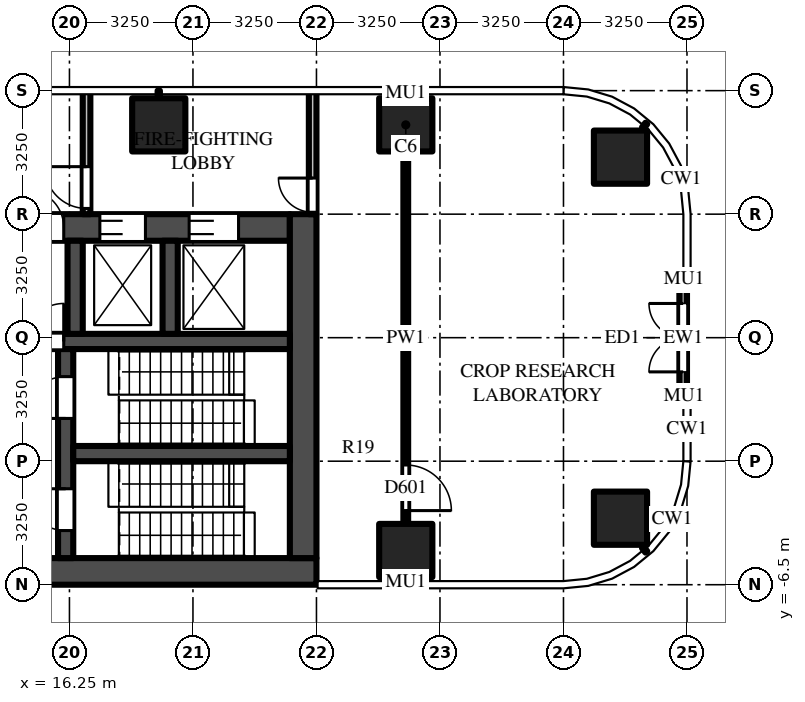
"""IFC4 building model, lengths in metres.
Left out: names, types, materials, properties, quantities, classifications, styles, units other than length and angle.
Written with IfcOpenShell. Run it as: python <this file> out.ifc"""

import sys

from ifc_helpers import new_model, si_unit, direction, frame, frame_2d, origin, origin_2d, place, context, subcontext, project, spatial, rectangle, extrude, source, transform, mapped, element, fill, save


model = new_model("IFC4")
c1 = context("Model", 3, precision=1e-05, world=origin(), true_north=direction((0.0, 1.0)))
c2 = subcontext(c1, "Body", "Model", "MODEL_VIEW")
j1 = project(units=[si_unit("LENGTHUNIT", "METRE"), si_unit("PLANEANGLEUNIT", "RADIAN")], contexts=[c1])
p1 = place(None, origin())
s1 = spatial("IfcSite", under=j1, at=p1, CompositionType="ELEMENT")
p2 = place(p1, origin())
s2 = spatial("IfcBuilding", under=s1, at=p2, CompositionType="ELEMENT")
p3 = place(p2, frame((0.0, 0.0, 38.5)))
s3 = spatial("IfcBuildingStorey", under=s2, at=p3, CompositionType="ELEMENT", Elevation=38.5)
m1 = source(origin(), c2, "Body", "SweptSolid", [
    extrude(rectangle(XDim=1.4, YDim=1.4, at=origin_2d()), origin(), (0.0, 0.0, 1.0), 4.5),
])
for number, where, z_axis, x_axis in (
    (1, (18.6, 5.6, 0.0), (0.0, 0.0, 1.0), (1.0, 0.0, 0.0)),
    (2, (25.1, 5.6, 0.0), (0.0, 0.0, 1.0), (1.0, 0.0, 0.0)),
    (3, (30.75, 4.75, 0.0), (0.0, 0.0, 1.0), (1.0, 0.0, 0.0)),
    (4, (25.1, -5.6, 0.0), (0.0, 0.0, 1.0), (1.0, 0.0, 0.0)),
    (5, (30.75, -4.75, 0.0), (0.0, 0.0, 1.0), (1.0, 0.0, 0.0)),
):
    element("IfcColumn", number, at=place(p3, frame(where, z_axis=z_axis, x_axis=x_axis)), inside=s3, PredefinedType="COLUMN", context=c2, shape_type="MappedRepresentation", body=[
        mapped(m1, transform((0.0, 0.0, 0.0))),
    ])
m2 = source(origin(), c2, "Body", "SweptSolid", [
    extrude(rectangle(XDim=16.45, YDim=0.7, at=frame_2d((8.225, 0.0))), origin(), (0.0, 0.0, 1.0), 4.25),
])
p4 = place(p3, frame((6.3, -6.15, 0.0), z_axis=(0.0, 0.0, 1.0), x_axis=(1.0, 0.0, 0.0)))
e6 = element("IfcWall", 6, at=p4, inside=s3, PredefinedType="SHEAR", context=c2, shape_type="MappedRepresentation", body=[
    mapped(m2, transform((0.0, 0.0, 0.0))),
])
m3 = source(origin(), c2, "Body", "SweptSolid", [
    extrude(rectangle(XDim=14.85, YDim=0.7, at=frame_2d((7.425, 0.0))), origin(), (0.0, 0.0, 1.0), 4.25),
])
p5 = place(p3, frame((7.2, 2.9, 0.0), z_axis=(0.0, 0.0, 1.0), x_axis=(1.0, 0.0, 0.0)))
e7 = element("IfcWall", 7, at=p5, inside=s3, PredefinedType="SHEAR", context=c2, shape_type="MappedRepresentation", body=[
    mapped(m3, transform((0.0, 0.0, 0.0))),
])
m4 = source(origin(), c2, "Body", "SweptSolid", [
    extrude(rectangle(XDim=1.3, YDim=2.1, at=frame_2d((0.65, 1.05))), frame((0.0, 0.36, 0.0), z_axis=(0.0, -1.0, 0.0), x_axis=(1.0, 0.0, 0.0)), (0.0, 0.0, 1.0), 0.72),
])
p6 = place(p5, frame((12.2, 0.0, 0.0)))
e8 = element("IfcOpeningElement", 8, at=p6, cuts=e7, PredefinedType="OPENING", context=c2, shape_type="MappedRepresentation", body=[
    mapped(m4, transform((0.0, 0.0, 0.0))),
])
m5 = source(origin(), c2, "Body", "SweptSolid", [
    extrude(rectangle(XDim=1.2, YDim=2.1, at=frame_2d((0.6, 1.05))), frame((0.0, 0.36, 0.0), z_axis=(0.0, -1.0, 0.0), x_axis=(1.0, 0.0, 0.0)), (0.0, 0.0, 1.0), 0.72),
])
p7 = place(p5, frame((9.85, 0.0, 0.0)))
e9 = element("IfcOpeningElement", 9, at=p7, cuts=e7, PredefinedType="OPENING", context=c2, shape_type="MappedRepresentation", body=[
    mapped(m5, transform((0.0, 0.0, 0.0))),
])
m6 = source(origin(), c2, "Body", "SweptSolid", [
    extrude(rectangle(XDim=1.0, YDim=2.1, at=frame_2d((0.5, 1.05))), frame((0.0, 0.36, 0.0), z_axis=(0.0, -1.0, 0.0), x_axis=(1.0, 0.0, 0.0)), (0.0, 0.0, 1.0), 0.72),
])
p8 = place(p5, frame((7.9, 0.0, 0.0)))
e10 = element("IfcOpeningElement", 10, at=p8, cuts=e7, PredefinedType="OPENING", context=c2, shape_type="MappedRepresentation", body=[
    mapped(m6, transform((0.0, 0.0, 0.0))),
])
m7 = source(origin(), c2, "Body", "SweptSolid", [
    extrude(rectangle(XDim=0.9, YDim=2.1, at=frame_2d((0.45, 1.05))), frame((0.0, 0.36, 0.0), z_axis=(0.0, -1.0, 0.0), x_axis=(1.0, 0.0, 0.0)), (0.0, 0.0, 1.0), 0.72),
])
p9 = place(p5, frame((0.65, 0.0, 0.0)))
e11 = element("IfcOpeningElement", 11, at=p9, cuts=e7, PredefinedType="OPENING", context=c2, shape_type="MappedRepresentation", body=[
    mapped(m7, transform((0.0, 0.0, 0.0))),
])
p10 = place(p5, frame((3.25, 0.0, 0.0)))
e12 = element("IfcOpeningElement", 12, at=p10, cuts=e7, PredefinedType="OPENING", context=c2, shape_type="MappedRepresentation", body=[
    mapped(m7, transform((0.0, 0.0, 0.0))),
])
p11 = place(p5, frame((5.8, 0.0, 0.0)))
e13 = element("IfcOpeningElement", 13, at=p11, cuts=e7, PredefinedType="OPENING", context=c2, shape_type="MappedRepresentation", body=[
    mapped(m6, transform((0.0, 0.0, 0.0))),
])
m8 = source(origin(), c2, "Body", "SweptSolid", [
    extrude(rectangle(XDim=9.05, YDim=0.7, at=frame_2d((4.525, 0.0))), origin(), (0.0, 0.0, 1.0), 4.25),
])
p12 = place(p3, frame((22.4, -5.8, 0.0), z_axis=(0.0, 0.0, 1.0), x_axis=(0.0, 1.0, 0.0)))
e14 = element("IfcWall", 14, at=p12, inside=s3, PredefinedType="SHEAR", context=c2, shape_type="MappedRepresentation", body=[
    mapped(m8, transform((0.0, 0.0, 0.0))),
])
m9 = source(origin(), c2, "Body", "SweptSolid", [
    extrude(rectangle(XDim=14.85, YDim=0.4, at=frame_2d((7.425, 0.0))), origin(), (0.0, 0.0, 1.0), 4.25),
])
p13 = place(p3, frame((7.2, -0.1, 0.0), z_axis=(0.0, 0.0, 1.0), x_axis=(1.0, 0.0, 0.0)))
e15 = element("IfcWall", 15, at=p13, inside=s3, PredefinedType="SHEAR", context=c2, shape_type="MappedRepresentation", body=[
    mapped(m9, transform((0.0, 0.0, 0.0))),
])
m10 = source(origin(), c2, "Body", "SweptSolid", [
    extrude(rectangle(XDim=1.0, YDim=2.1, at=frame_2d((0.5, 1.05))), frame((0.0, 0.21, 0.0), z_axis=(0.0, -1.0, 0.0), x_axis=(1.0, 0.0, 0.0)), (0.0, 0.0, 1.0), 0.42),
])
p14 = place(p13, frame((7.9, 0.0, 0.0)))
e16 = element("IfcOpeningElement", 16, at=p14, cuts=e15, PredefinedType="OPENING", context=c2, shape_type="MappedRepresentation", body=[
    mapped(m10, transform((0.0, 0.0, 0.0))),
])
m11 = source(origin(), c2, "Body", "SweptSolid", [
    extrude(rectangle(XDim=5.5, YDim=0.4, at=frame_2d((2.75, 0.0))), origin(), (0.0, 0.0, 1.0), 4.25),
])
p15 = place(p3, frame((16.15, -5.8, 0.0), z_axis=(0.0, 0.0, 1.0), x_axis=(0.0, 1.0, 0.0)))
e17 = element("IfcWall", 17, at=p15, inside=s3, PredefinedType="SHEAR", context=c2, shape_type="MappedRepresentation", body=[
    mapped(m11, transform((0.0, 0.0, 0.0))),
])
m12 = source(origin(), c2, "Body", "SweptSolid", [
    extrude(rectangle(XDim=1.1, YDim=2.1, at=frame_2d((0.55, 1.05))), frame((0.0, 0.21, 0.0), z_axis=(0.0, -1.0, 0.0), x_axis=(1.0, 0.0, 0.0)), (0.0, 0.0, 1.0), 0.42),
])
p16 = place(p15, frame((0.725, 0.0, 0.0)))
e18 = element("IfcOpeningElement", 18, at=p16, cuts=e17, PredefinedType="OPENING", context=c2, shape_type="MappedRepresentation", body=[
    mapped(m12, transform((0.0, 0.0, 0.0))),
])
p17 = place(p15, frame((3.675, 0.0, 0.0)))
e19 = element("IfcOpeningElement", 19, at=p17, cuts=e17, PredefinedType="OPENING", context=c2, shape_type="MappedRepresentation", body=[
    mapped(m12, transform((0.0, 0.0, 0.0))),
])
m13 = source(origin(), c2, "Body", "SweptSolid", [
    extrude(rectangle(XDim=5.7, YDim=0.4, at=frame_2d((2.85, 0.0))), origin(), (0.0, 0.0, 1.0), 4.25),
])
p18 = place(p3, frame((16.35, -3.05, 0.0), z_axis=(0.0, 0.0, 1.0), x_axis=(1.0, 0.0, 0.0)))
e20 = element("IfcWall", 20, at=p18, inside=s3, PredefinedType="SHEAR", context=c2, shape_type="MappedRepresentation", body=[
    mapped(m13, transform((0.0, 0.0, 0.0))),
])
m14 = source(origin(), c2, "Body", "SweptSolid", [
    extrude(rectangle(XDim=2.45, YDim=0.4, at=frame_2d((1.225, 0.0))), origin(), (0.0, 0.0, 1.0), 4.25),
])
for number, where, z_axis, x_axis in (
    (21, (16.4, 0.1, 0.0), (0.0, 0.0, 1.0), (0.0, 1.0, 0.0)),
    (22, (18.9, 0.1, 0.0), (0.0, 0.0, 1.0), (0.0, 1.0, 0.0)),
):
    element("IfcWall", number, at=place(p3, frame(where, z_axis=z_axis, x_axis=x_axis)), inside=s3, PredefinedType="SHEAR", context=c2, shape_type="MappedRepresentation", body=[
        mapped(m14, transform((0.0, 0.0, 0.0))),
    ])
m15 = source(origin(), c2, "Body", "SweptSolid", [
    extrude(rectangle(XDim=3.25, YDim=0.2, at=frame_2d((1.625, 0.0))), origin(), (0.0, 0.0, 1.0), 4.25),
])
p19 = place(p3, frame((16.7, 3.25, 0.0), z_axis=(0.0, 0.0, 1.0), x_axis=(0.0, 1.0, 0.0)))
e23 = element("IfcWall", 23, at=p19, inside=s3, PredefinedType="PARTITIONING", context=c2, shape_type="MappedRepresentation", body=[
    mapped(m15, transform((0.0, 0.0, 0.0))),
])
m16 = source(origin(), c2, "Body", "SweptSolid", [
    extrude(rectangle(XDim=1.1, YDim=2.1, at=frame_2d((0.55, 1.05))), frame((0.0, 0.11, 0.0), z_axis=(0.0, -1.0, 0.0), x_axis=(1.0, 0.0, 0.0)), (0.0, 0.0, 1.0), 0.22),
])
p20 = place(p19, frame((0.15, 0.0, 0.0)))
e24 = element("IfcOpeningElement", 24, at=p20, cuts=e23, PredefinedType="OPENING", context=c2, shape_type="MappedRepresentation", body=[
    mapped(m16, transform((0.0, 0.0, 0.0))),
])
p21 = place(p3, frame((22.65, 3.25, 0.0), z_axis=(0.0, 0.0, 1.0), x_axis=(0.0, 1.0, 0.0)))
e25 = element("IfcWall", 25, at=p21, inside=s3, PredefinedType="PARTITIONING", context=c2, shape_type="MappedRepresentation", body=[
    mapped(m15, transform((0.0, 0.0, 0.0))),
])
m17 = source(origin(), c2, "Body", "SweptSolid", [
    extrude(rectangle(XDim=0.9, YDim=2.1, at=frame_2d((0.45, 1.05))), frame((0.0, 0.11, 0.0), z_axis=(0.0, -1.0, 0.0), x_axis=(1.0, 0.0, 0.0)), (0.0, 0.0, 1.0), 0.22),
])
p22 = place(p21, frame((0.05, 0.0, 0.0)))
e26 = element("IfcOpeningElement", 26, at=p22, cuts=e25, PredefinedType="OPENING", context=c2, shape_type="MappedRepresentation", body=[
    mapped(m17, transform((0.0, 0.0, 0.0))),
])
m18 = source(origin(), c2, "Body", "SweptSolid", [
    extrude(rectangle(XDim=3.0, YDim=0.2, at=frame_2d((1.5, 0.0))), origin(), (0.0, 0.0, 1.0), 4.25),
])
p23 = place(p3, frame((32.4, -1.5, 0.0), z_axis=(0.0, 0.0, 1.0), x_axis=(0.0, 1.0, 0.0)))
e27 = element("IfcWall", 27, at=p23, inside=s3, PredefinedType="SOLIDWALL", context=c2, shape_type="MappedRepresentation", body=[
    mapped(m18, transform((0.0, 0.0, 0.0))),
])
m19 = source(origin(), c2, "Body", "SweptSolid", [
    extrude(rectangle(XDim=1.8, YDim=2.4, at=frame_2d((0.9, 1.2))), frame((0.0, 0.11, 0.0), z_axis=(0.0, -1.0, 0.0), x_axis=(1.0, 0.0, 0.0)), (0.0, 0.0, 1.0), 0.22),
])
p24 = place(p23, frame((0.6, 0.0, 0.0)))
e28 = element("IfcOpeningElement", 28, at=p24, cuts=e27, PredefinedType="OPENING", context=c2, shape_type="MappedRepresentation", body=[
    mapped(m19, transform((0.0, 0.0, 0.0))),
])
m20 = source(origin(), c2, "Body", "SweptSolid", [
    extrude(rectangle(XDim=9.8, YDim=0.125, at=frame_2d((4.9, 0.0))), origin(), (0.0, 0.0, 1.0), 3.468),
])
p25 = place(p3, frame((25.1, 4.9, 0.0), z_axis=(0.0, 0.0, 1.0), x_axis=(0.0, -1.0, 0.0)))
e29 = element("IfcWall", 29, at=p25, inside=s3, PredefinedType="PARTITIONING", context=c2, shape_type="MappedRepresentation", body=[
    mapped(m20, transform((0.0, 0.0, 0.0))),
])
m21 = source(origin(), c2, "Body", "SweptSolid", [
    extrude(rectangle(XDim=1.2, YDim=2.1, at=frame_2d((0.6, 1.05))), frame((0.0, 0.073, 0.0), z_axis=(0.0, -1.0, 0.0), x_axis=(1.0, 0.0, 0.0)), (0.0, 0.0, 1.0), 0.145),
])
p26 = place(p25, frame((8.25, 0.0, 0.0)))
e30 = element("IfcOpeningElement", 30, at=p26, cuts=e29, PredefinedType="OPENING", context=c2, shape_type="MappedRepresentation", body=[
    mapped(m21, transform((0.0, 0.0, 0.0))),
])
m22 = source(origin(), c2, "Body", "SweptSolid", [
    extrude(rectangle(XDim=1.3, YDim=2.1, at=frame_2d((0.65, 1.05))), frame((0.0, -0.275, 0.0), z_axis=(0.0, -1.0, 0.0), x_axis=(1.0, 0.0, 0.0)), (0.0, 0.0, 1.0), 0.05),
])
p27 = place(p6, origin())
e31 = element("IfcDoor", 31, at=p27, inside=s3, OperationType="DOUBLE_DOOR_SLIDING", PredefinedType="DOOR", context=c2, shape_type="MappedRepresentation", body=[
    mapped(m22, transform((0.0, 0.0, 0.0))),
])
fill(e8, e31)
m23 = source(origin(), c2, "Body", "SweptSolid", [
    extrude(rectangle(XDim=1.2, YDim=2.1, at=frame_2d((0.6, 1.05))), frame((0.0, -0.275, 0.0), z_axis=(0.0, -1.0, 0.0), x_axis=(1.0, 0.0, 0.0)), (0.0, 0.0, 1.0), 0.05),
])
p28 = place(p7, origin())
e32 = element("IfcDoor", 32, at=p28, inside=s3, OperationType="DOUBLE_DOOR_SLIDING", PredefinedType="DOOR", context=c2, shape_type="MappedRepresentation", body=[
    mapped(m23, transform((0.0, 0.0, 0.0))),
])
fill(e9, e32)
m24 = source(origin(), c2, "Body", "SweptSolid", [
    extrude(rectangle(XDim=1.1, YDim=2.1, at=frame_2d((0.55, 1.05))), frame((0.0, 0.025, 0.0), z_axis=(0.0, -1.0, 0.0), x_axis=(1.0, 0.0, 0.0)), (0.0, 0.0, 1.0), 0.05),
])
p29 = place(p16, origin())
e33 = element("IfcDoor", 33, at=p29, inside=s3, OperationType="SINGLE_SWING_RIGHT", PredefinedType="DOOR", context=c2, shape_type="MappedRepresentation", body=[
    mapped(m24, transform((0.0, 0.0, 0.0))),
])
fill(e18, e33)
p30 = place(p17, origin())
e34 = element("IfcDoor", 34, at=p30, inside=s3, OperationType="SINGLE_SWING_LEFT", PredefinedType="DOOR", context=c2, shape_type="MappedRepresentation", body=[
    mapped(m24, transform((0.0, 0.0, 0.0))),
])
fill(e19, e34)
m25 = source(origin(), c2, "Body", "SweptSolid", [
    extrude(rectangle(XDim=1.0, YDim=2.1, at=frame_2d((0.5, 1.05))), frame((0.0, 0.025, 0.0), z_axis=(0.0, -1.0, 0.0), x_axis=(1.0, 0.0, 0.0)), (0.0, 0.0, 1.0), 0.05),
])
p31 = place(p14, origin())
e35 = element("IfcDoor", 35, at=p31, inside=s3, OperationType="SINGLE_SWING_RIGHT", PredefinedType="DOOR", context=c2, shape_type="MappedRepresentation", body=[
    mapped(m25, transform((0.0, 0.0, 0.0))),
])
fill(e16, e35)
m26 = source(origin(), c2, "Body", "SweptSolid", [
    extrude(rectangle(XDim=1.0, YDim=2.1, at=frame_2d((0.5, 1.05))), frame((0.0, -0.275, 0.0), z_axis=(0.0, -1.0, 0.0), x_axis=(1.0, 0.0, 0.0)), (0.0, 0.0, 1.0), 0.05),
])
p32 = place(p8, origin())
e36 = element("IfcDoor", 36, at=p32, inside=s3, OperationType="SINGLE_SWING_LEFT", PredefinedType="DOOR", context=c2, shape_type="MappedRepresentation", body=[
    mapped(m26, transform((0.0, 0.0, 0.0))),
])
fill(e10, e36)
p33 = place(p20, origin())
e37 = element("IfcDoor", 37, at=p33, inside=s3, OperationType="SINGLE_SWING_RIGHT", PredefinedType="DOOR", context=c2, shape_type="MappedRepresentation", body=[
    mapped(m24, transform((0.0, 0.0, 0.0))),
])
fill(e24, e37)
m27 = source(origin(), c2, "Body", "SweptSolid", [
    extrude(rectangle(XDim=0.9, YDim=2.1, at=frame_2d((0.45, 1.05))), frame((0.0, 0.025, 0.0), z_axis=(0.0, -1.0, 0.0), x_axis=(1.0, 0.0, 0.0)), (0.0, 0.0, 1.0), 0.05),
])
p34 = place(p22, origin())
e38 = element("IfcDoor", 38, at=p34, inside=s3, OperationType="SINGLE_SWING_RIGHT", PredefinedType="DOOR", context=c2, shape_type="MappedRepresentation", body=[
    mapped(m27, transform((0.0, 0.0, 0.0))),
])
fill(e26, e38)
m28 = source(origin(), c2, "Body", "SweptSolid", [
    extrude(rectangle(XDim=1.8, YDim=2.4, at=frame_2d((0.9, 1.2))), frame((0.0, 0.025, 0.0), z_axis=(0.0, -1.0, 0.0), x_axis=(1.0, 0.0, 0.0)), (0.0, 0.0, 1.0), 0.05),
])
p35 = place(p24, origin())
e39 = element("IfcDoor", 39, at=p35, inside=s3, OperationType="DOUBLE_DOOR_SINGLE_SWING", PredefinedType="DOOR", context=c2, shape_type="MappedRepresentation", body=[
    mapped(m28, transform((0.0, 0.0, 0.0))),
])
fill(e28, e39)
m29 = source(origin(), c2, "Body", "SweptSolid", [
    extrude(rectangle(XDim=1.2, YDim=2.1, at=frame_2d((0.6, 1.05))), frame((0.0, 0.025, 0.0), z_axis=(0.0, -1.0, 0.0), x_axis=(1.0, 0.0, 0.0)), (0.0, 0.0, 1.0), 0.05),
])
p36 = place(p26, origin())
e40 = element("IfcDoor", 40, at=p36, inside=s3, OperationType="SINGLE_SWING_RIGHT", PredefinedType="DOOR", context=c2, shape_type="MappedRepresentation", body=[
    mapped(m29, transform((0.0, 0.0, 0.0))),
])
fill(e30, e40)
save(model, sys.argv[1])
